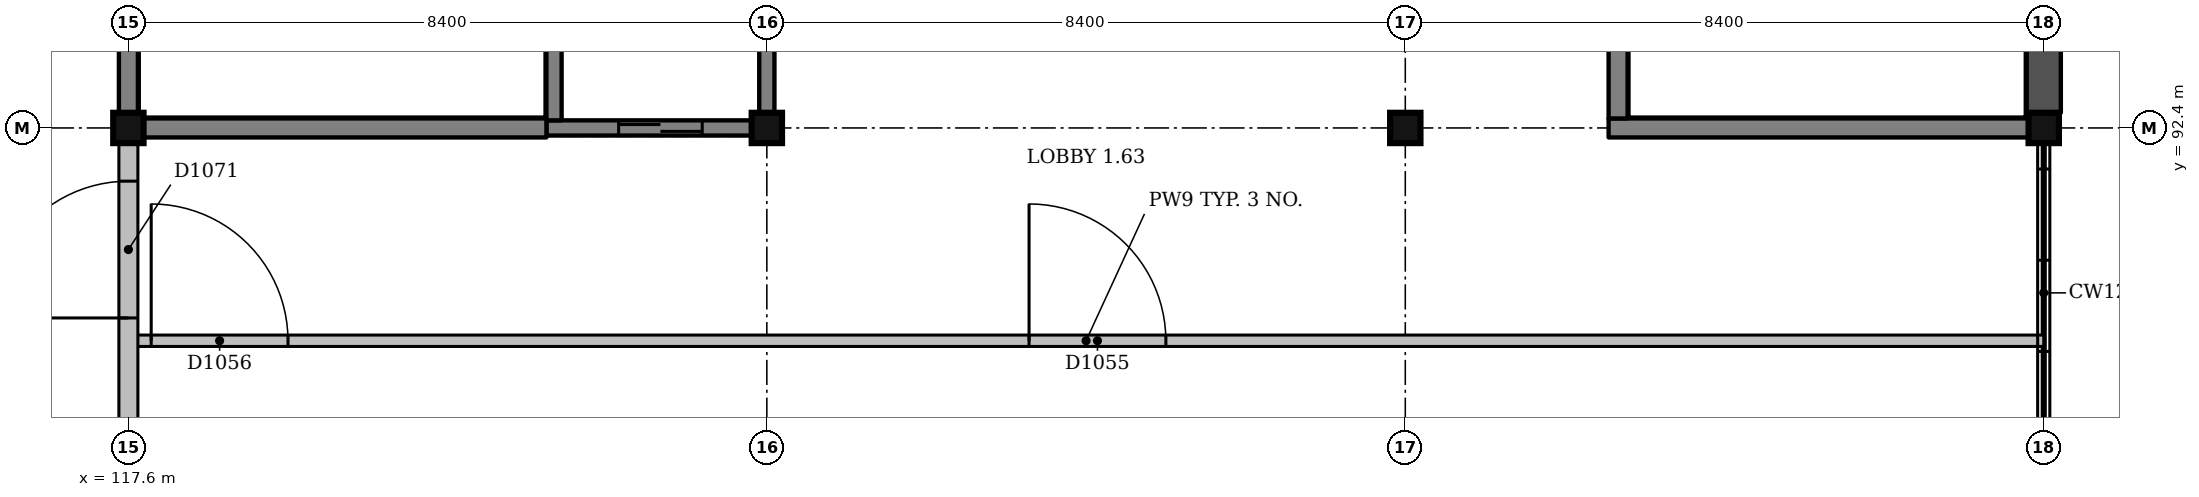
"""IFC4 building model, lengths in metres.
Left out: names, types, materials, properties, quantities, classifications, styles, units other than length and angle.
Written with IfcOpenShell. Run it as: python <this file> out.ifc"""

import sys

from ifc_helpers import new_model, si_unit, direction, frame, frame_2d, origin, origin_2d, place, context, subcontext, project, spatial, rectangle, extrude, element, fill, save


model = new_model("IFC4")
c1 = context("Model", 3, precision=1e-05, world=origin(), true_north=direction((0.0, 1.0)))
c2 = subcontext(c1, "Body", "Model", "MODEL_VIEW")
j1 = project(units=[si_unit("LENGTHUNIT", "METRE"), si_unit("PLANEANGLEUNIT", "RADIAN")], contexts=[c1])
p1 = place(None, origin())
s1 = spatial("IfcSite", under=j1, at=p1, CompositionType="ELEMENT")
p2 = place(p1, origin())
s2 = spatial("IfcBuilding", under=s1, at=p2, CompositionType="ELEMENT")
p3 = place(p2, frame((0.0, 0.0, 4.5)))
s3 = spatial("IfcBuildingStorey", under=s2, at=p3, CompositionType="ELEMENT", Elevation=4.5)
for number, where, z_axis, x_axis in (
    (1, (117.6, 92.4, -1.5), (0.0, 0.0, 1.0), (1.0, 0.0, 0.0)),
    (2, (126.0, 92.4, -1.5), (0.0, 0.0, 1.0), (1.0, 0.0, 0.0)),
    (3, (134.4, 92.4, -1.5), (0.0, 0.0, 1.0), (1.0, 0.0, 0.0)),
    (4, (142.8, 92.4, -1.5), (0.0, 0.0, 1.0), (1.0, 0.0, 0.0)),
):
    element("IfcColumn", number, at=place(p3, frame(where, z_axis=z_axis, x_axis=x_axis)), inside=s3, PredefinedType="COLUMN", context=c2, shape_type="SweptSolid", body=[
        extrude(rectangle(XDim=0.4, YDim=0.4, at=origin_2d()), origin(), (0.0, 0.0, 1.0), 6.0),
    ])
p4 = place(p3, frame((123.1, 92.4, 0.0), z_axis=(0.0, 0.0, 1.0), x_axis=(1.0, 0.0, 0.0)))
e5 = element("IfcWall", 5, at=p4, inside=s3, PredefinedType="SHEAR", context=c2, shape_type="SweptSolid", body=[
    extrude(rectangle(XDim=2.7, YDim=0.2, at=frame_2d((1.35, 0.0))), origin(), (0.0, 0.0, 1.0), 4.5),
])
p5 = place(p4, frame((0.95, 0.0, 0.0)))
e6 = element("IfcOpeningElement", 6, at=p5, cuts=e5, PredefinedType="OPENING", context=c2, shape_type="SweptSolid", body=[
    extrude(rectangle(XDim=1.1, YDim=2.1, at=frame_2d((0.55, 1.05))), frame((0.0, 0.11, 0.0), z_axis=(0.0, -1.0, 0.0), x_axis=(1.0, 0.0, 0.0)), (0.0, 0.0, 1.0), 0.22),
])
p6 = place(p3, frame((123.2, 92.5, 0.0), z_axis=(0.0, 0.0, 1.0), x_axis=(0.0, 1.0, 0.0)))
e7 = element("IfcWall", 7, at=p6, inside=s3, PredefinedType="SHEAR", context=c2, shape_type="SweptSolid", body=[
    extrude(rectangle(XDim=4.0, YDim=0.2, at=frame_2d((2.0, 0.0))), origin(), (0.0, 0.0, 1.0), 4.5),
])
p7 = place(p3, frame((126.0, 92.6, 0.0), z_axis=(0.0, 0.0, 1.0), x_axis=(0.0, 1.0, 0.0)))
e8 = element("IfcWall", 8, at=p7, inside=s3, PredefinedType="SHEAR", context=c2, shape_type="SweptSolid", body=[
    extrude(rectangle(XDim=3.9, YDim=0.2, at=frame_2d((1.95, 0.0))), origin(), (0.0, 0.0, 1.0), 4.5),
])
p8 = place(p3, frame((117.8, 92.4, 0.0), z_axis=(0.0, 0.0, 1.0), x_axis=(1.0, 0.0, 0.0)))
e9 = element("IfcWall", 9, at=p8, inside=s3, PredefinedType="SHEAR", context=c2, shape_type="SweptSolid", body=[
    extrude(rectangle(XDim=5.3, YDim=0.25, at=frame_2d((2.65, 0.0))), origin(), (0.0, 0.0, 1.0), 4.5),
])
p9 = place(p3, frame((117.6, 92.6, 0.0), z_axis=(0.0, 0.0, 1.0), x_axis=(0.0, 1.0, 0.0)))
e10 = element("IfcWall", 10, at=p9, inside=s3, PredefinedType="SHEAR", context=c2, shape_type="SweptSolid", body=[
    extrude(rectangle(XDim=8.0, YDim=0.25, at=frame_2d((4.0, 0.0))), origin(), (0.0, 0.0, 1.0), 4.5),
])
p10 = place(p9, frame((6.35, 0.0, 0.0)))
e11 = element("IfcOpeningElement", 11, at=p10, cuts=e10, PredefinedType="OPENING", context=c2, shape_type="SweptSolid", body=[
    extrude(rectangle(XDim=1.0, YDim=2.1, at=frame_2d((0.5, 1.05))), frame((0.0, 0.135, 0.0), z_axis=(0.0, -1.0, 0.0), x_axis=(1.0, 0.0, 0.0)), (0.0, 0.0, 1.0), 0.27),
])
p11 = place(p3, frame((137.075, 92.4, 0.0), z_axis=(0.0, 0.0, 1.0), x_axis=(1.0, 0.0, 0.0)))
e12 = element("IfcWall", 12, at=p11, inside=s3, PredefinedType="SHEAR", context=c2, shape_type="SweptSolid", body=[
    extrude(rectangle(XDim=5.525, YDim=0.25, at=frame_2d((2.763, 0.0))), origin(), (0.0, 0.0, 1.0), 4.5),
])
p12 = place(p3, frame((137.2, 92.525, 0.0), z_axis=(0.0, 0.0, 1.0), x_axis=(0.0, 1.0, 0.0)))
e13 = element("IfcWall", 13, at=p12, inside=s3, PredefinedType="SHEAR", context=c2, shape_type="SweptSolid", body=[
    extrude(rectangle(XDim=8.15, YDim=0.25, at=frame_2d((4.075, 0.0))), origin(), (0.0, 0.0, 1.0), 4.5),
])
p13 = place(p12, frame((6.525, 0.0, 0.0)))
e14 = element("IfcOpeningElement", 14, at=p13, cuts=e13, PredefinedType="OPENING", context=c2, shape_type="SweptSolid", body=[
    extrude(rectangle(XDim=1.0, YDim=2.1, at=frame_2d((0.5, 1.05))), frame((0.0, 0.135, 0.0), z_axis=(0.0, -1.0, 0.0), x_axis=(1.0, 0.0, 0.0)), (0.0, 0.0, 1.0), 0.27),
])
p14 = place(p3, frame((142.8, 92.6, 0.0), z_axis=(0.0, 0.0, 1.0), x_axis=(0.0, 1.0, 0.0)))
e15 = element("IfcWall", 15, at=p14, inside=s3, PredefinedType="SOLIDWALL", context=c2, shape_type="SweptSolid", body=[
    extrude(rectangle(XDim=3.94, YDim=0.45, at=frame_2d((1.97, 0.0))), origin(), (0.0, 0.0, 1.0), 3.65),
])
p15 = place(p3, frame((117.6, 89.6, 0.0), z_axis=(0.0, 0.0, 1.0), x_axis=(1.0, 0.0, 0.0)))
e16 = element("IfcWall", 16, at=p15, inside=s3, PredefinedType="PARTITIONING", context=c2, shape_type="SweptSolid", body=[
    extrude(rectangle(XDim=25.2, YDim=0.15, at=frame_2d((12.6, 0.0))), origin(), (0.0, 0.0, 1.0), 2.37),
])
p16 = place(p15, frame((11.85, 0.0, 0.0)))
e17 = element("IfcOpeningElement", 17, at=p16, cuts=e16, PredefinedType="OPENING", context=c2, shape_type="SweptSolid", body=[
    extrude(rectangle(XDim=1.8, YDim=2.1, at=frame_2d((0.9, 1.05))), frame((0.0, 0.085, 0.0), z_axis=(0.0, -1.0, 0.0), x_axis=(1.0, 0.0, 0.0)), (0.0, 0.0, 1.0), 0.17),
])
p17 = place(p15, frame((0.3, 0.0, 0.0)))
e18 = element("IfcOpeningElement", 18, at=p17, cuts=e16, PredefinedType="OPENING", context=c2, shape_type="SweptSolid", body=[
    extrude(rectangle(XDim=1.8, YDim=2.1, at=frame_2d((0.9, 1.05))), frame((0.0, 0.085, 0.0), z_axis=(0.0, -1.0, 0.0), x_axis=(1.0, 0.0, 0.0)), (0.0, 0.0, 1.0), 0.17),
])
p18 = place(p3, frame((117.6, 84.2, 0.0), z_axis=(0.0, 0.0, 1.0), x_axis=(0.0, 1.0, 0.0)))
e19 = element("IfcWall", 19, at=p18, inside=s3, PredefinedType="SOLIDWALL", context=c2, shape_type="SweptSolid", body=[
    extrude(rectangle(XDim=8.0, YDim=0.25, at=frame_2d((4.0, 0.0))), origin(), (0.0, 0.0, 1.0), 3.65),
])
p19 = place(p18, frame((5.7, 0.0, 0.0)))
e20 = element("IfcOpeningElement", 20, at=p19, cuts=e19, PredefinedType="OPENING", context=c2, shape_type="SweptSolid", body=[
    extrude(rectangle(XDim=1.8, YDim=2.1, at=frame_2d((0.9, 1.05))), frame((0.0, 0.135, 0.0), z_axis=(0.0, -1.0, 0.0), x_axis=(1.0, 0.0, 0.0)), (0.0, 0.0, 1.0), 0.27),
])
p20 = place(p16, origin())
e21 = element("IfcDoor", 21, at=p20, inside=s3, OperationType="DOUBLE_DOOR_SINGLE_SWING", PredefinedType="DOOR", context=c2, shape_type="SweptSolid", body=[
    extrude(rectangle(XDim=1.8, YDim=2.1, at=frame_2d((0.9, 1.05))), frame((0.0, 0.025, 0.0), z_axis=(0.0, -1.0, 0.0), x_axis=(1.0, 0.0, 0.0)), (0.0, 0.0, 1.0), 0.05),
])
fill(e17, e21)
p21 = place(p17, origin())
e22 = element("IfcDoor", 22, at=p21, inside=s3, OperationType="DOUBLE_DOOR_SINGLE_SWING", PredefinedType="DOOR", context=c2, shape_type="SweptSolid", body=[
    extrude(rectangle(XDim=1.8, YDim=2.1, at=frame_2d((0.9, 1.05))), frame((0.0, 0.025, 0.0), z_axis=(0.0, -1.0, 0.0), x_axis=(1.0, 0.0, 0.0)), (0.0, 0.0, 1.0), 0.05),
])
fill(e18, e22)
p22 = place(p19, origin())
e23 = element("IfcDoor", 23, at=p22, inside=s3, OperationType="DOUBLE_DOOR_SINGLE_SWING", PredefinedType="DOOR", context=c2, shape_type="SweptSolid", body=[
    extrude(rectangle(XDim=1.8, YDim=2.1, at=frame_2d((0.9, 1.05))), frame((0.0, 0.025, 0.0), z_axis=(0.0, -1.0, 0.0), x_axis=(1.0, 0.0, 0.0)), (0.0, 0.0, 1.0), 0.05),
])
fill(e20, e23)
p23 = place(p5, origin())
e24 = element("IfcDoor", 24, at=p23, inside=s3, OperationType="SLIDING_TO_RIGHT", PredefinedType="DOOR", context=c2, shape_type="SweptSolid", body=[
    extrude(rectangle(XDim=1.1, YDim=2.1, at=frame_2d((0.55, 1.05))), frame((0.0, 0.025, 0.0), z_axis=(0.0, -1.0, 0.0), x_axis=(1.0, 0.0, 0.0)), (0.0, 0.0, 1.0), 0.05),
])
fill(e6, e24)
save(model, sys.argv[1])
